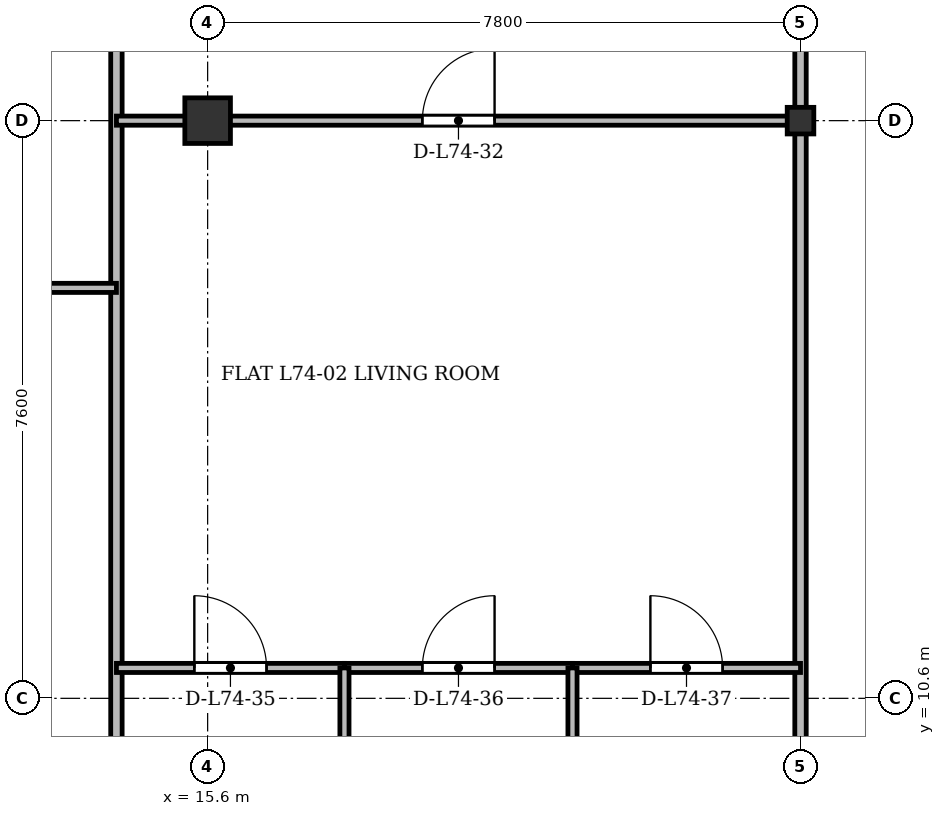
"""IFC4 building model, lengths in metres.
Left out: names, types, materials, properties, quantities, classifications, styles, units other than length and angle.
Written with IfcOpenShell. Run it as: python <this file> out.ifc"""

import sys

from ifc_helpers import new_model, si_unit, direction, frame, frame_2d, origin, origin_2d, place, context, subcontext, project, spatial, rectangle, i_section, extrude, source, transform, mapped, element, fill, save


model = new_model("IFC4")
c1 = context("Model", 3, precision=1e-05, world=origin(), true_north=direction((0.0, 1.0)))
c2 = subcontext(c1, "Body", "Model", "MODEL_VIEW")
j1 = project(units=[si_unit("LENGTHUNIT", "METRE"), si_unit("PLANEANGLEUNIT", "RADIAN")], contexts=[c1])
p1 = place(None, origin())
s1 = spatial("IfcSite", under=j1, at=p1, CompositionType="ELEMENT")
p2 = place(p1, origin())
s2 = spatial("IfcBuilding", under=s1, at=p2, CompositionType="ELEMENT")
p3 = place(p2, frame((0.0, 0.0, 284.7)))
s3 = spatial("IfcBuildingStorey", under=s2, at=p3, CompositionType="ELEMENT", Elevation=284.7)
m1 = source(origin(), c2, "Body", "SweptSolid", [
    extrude(rectangle(XDim=0.6, YDim=0.6, at=origin_2d()), origin(), (0.0, 0.0, 1.0), 3.6),
])
p4 = place(p3, frame((15.6, 18.2, 0.0), z_axis=(0.0, 0.0, 1.0), x_axis=(1.0, 0.0, 0.0)))
e1 = element("IfcColumn", 1, at=p4, inside=s3, PredefinedType="COLUMN", context=c2, shape_type="MappedRepresentation", body=[
    mapped(m1, transform((0.0, 0.0, 0.0), x_axis=(1.0, 0.0, 0.0), y_axis=(0.0, 1.0, 0.0), z_axis=(0.0, 0.0, 1.0), scale=1.0)),
])
m2 = source(origin(), c2, "Body", "SweptSolid", [
    extrude(i_section(OverallWidth=0.35, OverallDepth=0.35, WebThickness=0.018, FlangeThickness=0.028, at=origin_2d()), origin(), (0.0, 0.0, 1.0), 3.6),
])
p5 = place(p3, frame((23.4, 18.2, 0.0), z_axis=(0.0, 0.0, 1.0), x_axis=(1.0, 0.0, 0.0)))
e2 = element("IfcColumn", 2, at=p5, inside=s3, PredefinedType="COLUMN", context=c2, shape_type="MappedRepresentation", body=[
    mapped(m2, transform((0.0, 0.0, 0.0), x_axis=(1.0, 0.0, 0.0), y_axis=(0.0, 1.0, 0.0), z_axis=(0.0, 0.0, 1.0), scale=1.0)),
])
p6 = place(p3, frame((14.4, 3.725, 0.0), z_axis=(0.0, 0.0, 1.0), x_axis=(0.0, 1.0, 0.0)))
e3 = element("IfcWall", 3, at=p6, inside=s3, PredefinedType="PARTITIONING", context=c2, shape_type="SweptSolid", body=[
    extrude(rectangle(XDim=27.275, YDim=0.15, at=frame_2d((13.637, 0.0))), origin(), (0.0, 0.0, 1.0), 2.92),
])
p7 = place(p3, frame((23.4, 3.725, 0.0), z_axis=(0.0, 0.0, 1.0), x_axis=(0.0, 1.0, 0.0)))
e4 = element("IfcWall", 4, at=p7, inside=s3, PredefinedType="PARTITIONING", context=c2, shape_type="SweptSolid", body=[
    extrude(rectangle(XDim=27.275, YDim=0.15, at=frame_2d((13.637, 0.0))), origin(), (0.0, 0.0, 1.0), 2.87),
])
p8 = place(p3, frame((8.425, 16.0, 0.0), z_axis=(0.0, 0.0, 1.0), x_axis=(1.0, 0.0, 0.0)))
e5 = element("IfcWall", 5, at=p8, inside=s3, PredefinedType="PARTITIONING", context=c2, shape_type="SweptSolid", body=[
    extrude(rectangle(XDim=5.975, YDim=0.12, at=frame_2d((2.987, 0.0))), origin(), (0.0, 0.0, 1.0), 2.87),
])
p9 = place(p8, frame((2.42, 0.0, 0.0)))
e6 = element("IfcOpeningElement", 6, at=p9, cuts=e5, PredefinedType="OPENING", context=c2, shape_type="SweptSolid", body=[
    extrude(rectangle(XDim=0.95, YDim=2.15, at=frame_2d((0.475, 1.075))), frame((0.0, 0.07, 0.0), z_axis=(0.0, -1.0, 0.0), x_axis=(1.0, 0.0, 0.0)), (0.0, 0.0, 1.0), 0.14),
])
p10 = place(p3, frame((14.4, 18.2, 0.0), z_axis=(0.0, 0.0, 1.0), x_axis=(1.0, 0.0, 0.0)))
e7 = element("IfcWall", 7, at=p10, inside=s3, PredefinedType="PARTITIONING", context=c2, shape_type="SweptSolid", body=[
    extrude(rectangle(XDim=9.0, YDim=0.12, at=frame_2d((4.5, 0.0))), origin(), (0.0, 0.0, 1.0), 2.92),
])
p11 = place(p10, frame((4.025, 0.0, 0.0)))
e8 = element("IfcOpeningElement", 8, at=p11, cuts=e7, PredefinedType="OPENING", context=c2, shape_type="SweptSolid", body=[
    extrude(rectangle(XDim=0.95, YDim=2.15, at=frame_2d((0.475, 1.075))), frame((0.0, 0.07, 0.0), z_axis=(0.0, -1.0, 0.0), x_axis=(1.0, 0.0, 0.0)), (0.0, 0.0, 1.0), 0.14),
])
p12 = place(p3, frame((14.4, 11.0, 0.0), z_axis=(0.0, 0.0, 1.0), x_axis=(1.0, 0.0, 0.0)))
e9 = element("IfcWall", 9, at=p12, inside=s3, PredefinedType="PARTITIONING", context=c2, shape_type="SweptSolid", body=[
    extrude(rectangle(XDim=3.0, YDim=0.12, at=frame_2d((1.5, 0.0))), origin(), (0.0, 0.0, 1.0), 2.87),
])
p13 = place(p12, frame((1.025, 0.0, 0.0)))
e10 = element("IfcOpeningElement", 10, at=p13, cuts=e9, PredefinedType="OPENING", context=c2, shape_type="SweptSolid", body=[
    extrude(rectangle(XDim=0.95, YDim=2.15, at=frame_2d((0.475, 1.075))), frame((0.0, 0.07, 0.0), z_axis=(0.0, -1.0, 0.0), x_axis=(1.0, 0.0, 0.0)), (0.0, 0.0, 1.0), 0.14),
])
p14 = place(p3, frame((17.4, 11.0, 0.0), z_axis=(0.0, 0.0, 1.0), x_axis=(1.0, 0.0, 0.0)))
e11 = element("IfcWall", 11, at=p14, inside=s3, PredefinedType="PARTITIONING", context=c2, shape_type="SweptSolid", body=[
    extrude(rectangle(XDim=3.0, YDim=0.12, at=frame_2d((1.5, 0.0))), origin(), (0.0, 0.0, 1.0), 3.37),
])
p15 = place(p14, frame((1.025, 0.0, 0.0)))
e12 = element("IfcOpeningElement", 12, at=p15, cuts=e11, PredefinedType="OPENING", context=c2, shape_type="SweptSolid", body=[
    extrude(rectangle(XDim=0.95, YDim=2.15, at=frame_2d((0.475, 1.075))), frame((0.0, 0.07, 0.0), z_axis=(0.0, -1.0, 0.0), x_axis=(1.0, 0.0, 0.0)), (0.0, 0.0, 1.0), 0.14),
])
p16 = place(p3, frame((17.4, 3.725, 0.0), z_axis=(0.0, 0.0, 1.0), x_axis=(0.0, 1.0, 0.0)))
e13 = element("IfcWall", 13, at=p16, inside=s3, PredefinedType="PARTITIONING", context=c2, shape_type="SweptSolid", body=[
    extrude(rectangle(XDim=7.275, YDim=0.12, at=frame_2d((3.637, 0.0))), origin(), (0.0, 0.0, 1.0), 2.92),
])
p17 = place(p3, frame((20.4, 11.0, 0.0), z_axis=(0.0, 0.0, 1.0), x_axis=(1.0, 0.0, 0.0)))
e14 = element("IfcWall", 14, at=p17, inside=s3, PredefinedType="PARTITIONING", context=c2, shape_type="SweptSolid", body=[
    extrude(rectangle(XDim=3.0, YDim=0.12, at=frame_2d((1.5, 0.0))), origin(), (0.0, 0.0, 1.0), 2.87),
])
p18 = place(p17, frame((1.025, 0.0, 0.0)))
e15 = element("IfcOpeningElement", 15, at=p18, cuts=e14, PredefinedType="OPENING", context=c2, shape_type="SweptSolid", body=[
    extrude(rectangle(XDim=0.95, YDim=2.15, at=frame_2d((0.475, 1.075))), frame((0.0, 0.07, 0.0), z_axis=(0.0, -1.0, 0.0), x_axis=(1.0, 0.0, 0.0)), (0.0, 0.0, 1.0), 0.14),
])
p19 = place(p3, frame((20.4, 3.725, 0.0), z_axis=(0.0, 0.0, 1.0), x_axis=(0.0, 1.0, 0.0)))
e16 = element("IfcWall", 16, at=p19, inside=s3, PredefinedType="PARTITIONING", context=c2, shape_type="SweptSolid", body=[
    extrude(rectangle(XDim=7.275, YDim=0.12, at=frame_2d((3.637, 0.0))), origin(), (0.0, 0.0, 1.0), 2.92),
])
m3 = source(origin(), c2, "Body", "SweptSolid", [
    extrude(rectangle(XDim=0.95, YDim=2.15, at=frame_2d((0.475, 1.075))), frame((0.0, 0.025, 0.0), z_axis=(0.0, -1.0, 0.0), x_axis=(1.0, 0.0, 0.0)), (0.0, 0.0, 1.0), 0.05),
])
p20 = place(p11, origin())
e17 = element("IfcDoor", 17, at=p20, inside=s3, OperationType="SINGLE_SWING_RIGHT", PredefinedType="DOOR", context=c2, shape_type="MappedRepresentation", body=[
    mapped(m3, transform((0.0, 0.0, 0.0), x_axis=(1.0, 0.0, 0.0), y_axis=(0.0, 1.0, 0.0), z_axis=(0.0, 0.0, 1.0), scale=1.0)),
])
fill(e8, e17)
p21 = place(p13, origin())
e18 = element("IfcDoor", 18, at=p21, inside=s3, OperationType="SINGLE_SWING_LEFT", PredefinedType="DOOR", context=c2, shape_type="MappedRepresentation", body=[
    mapped(m3, transform((0.0, 0.0, 0.0), x_axis=(1.0, 0.0, 0.0), y_axis=(0.0, 1.0, 0.0), z_axis=(0.0, 0.0, 1.0), scale=1.0)),
])
fill(e10, e18)
p22 = place(p15, origin())
e19 = element("IfcDoor", 19, at=p22, inside=s3, OperationType="SINGLE_SWING_RIGHT", PredefinedType="DOOR", context=c2, shape_type="MappedRepresentation", body=[
    mapped(m3, transform((0.0, 0.0, 0.0), x_axis=(1.0, 0.0, 0.0), y_axis=(0.0, 1.0, 0.0), z_axis=(0.0, 0.0, 1.0), scale=1.0)),
])
fill(e12, e19)
p23 = place(p18, origin())
e20 = element("IfcDoor", 20, at=p23, inside=s3, OperationType="SINGLE_SWING_LEFT", PredefinedType="DOOR", context=c2, shape_type="MappedRepresentation", body=[
    mapped(m3, transform((0.0, 0.0, 0.0), x_axis=(1.0, 0.0, 0.0), y_axis=(0.0, 1.0, 0.0), z_axis=(0.0, 0.0, 1.0), scale=1.0)),
])
fill(e15, e20)
save(model, sys.argv[1])
